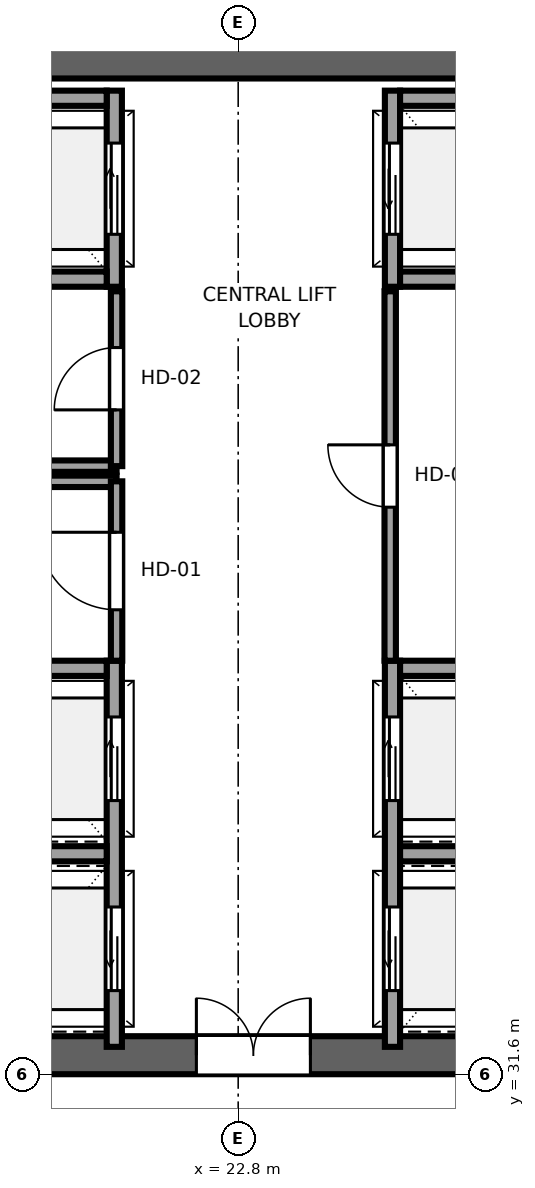
"""IFC4 building model, lengths in metres.
Left out: names, types, materials, properties, quantities, classifications, styles, units other than length and angle.
Written with IfcOpenShell. Run it as: python <this file> out.ifc"""

import sys

from ifc_helpers import new_model, si_unit, direction, frame, frame_2d, origin, place, context, subcontext, project, spatial, rectangle, extrude, source, transform, mapped, element, fill, save


model = new_model("IFC4")
c1 = context("Model", 3, precision=1e-05, world=origin(), true_north=direction((0.0, 1.0)))
c2 = subcontext(c1, "Body", "Model", "MODEL_VIEW")
j1 = project(units=[si_unit("LENGTHUNIT", "METRE"), si_unit("PLANEANGLEUNIT", "RADIAN")], contexts=[c1])
p1 = place(None, origin())
s1 = spatial("IfcSite", under=j1, at=p1, CompositionType="ELEMENT")
p2 = place(p1, origin())
s2 = spatial("IfcBuilding", under=s1, at=p2, CompositionType="ELEMENT")
p3 = place(p2, frame((0.0, 0.0, 286.55)))
s3 = spatial("IfcBuildingStorey", under=s2, at=p3, CompositionType="ELEMENT", Elevation=286.55)
p4 = place(p3, frame((10.0, 31.85, 0.0), z_axis=(0.0, 0.0, 1.0), x_axis=(1.0, 0.0, 0.0)))
e1 = element("IfcWall", 1, at=p4, inside=s3, PredefinedType="SHEAR", context=c2, shape_type="SweptSolid", body=[
    extrude(rectangle(XDim=26.0, YDim=0.5, at=frame_2d((13.0, 0.0))), origin(), (0.0, 0.0, 1.0), 4.4),
])
p5 = place(p4, frame((7.45, 0.0, 0.0), z_axis=(0.0, 0.0, 1.0), x_axis=(-1.0, 0.0, 0.0)))
e2 = element("IfcOpeningElement", 2, at=p5, cuts=e1, PredefinedType="OPENING", context=c2, shape_type="SweptSolid", body=[
    extrude(rectangle(XDim=1.5, YDim=2.04, at=frame_2d((0.75, 1.02))), frame((0.0, 0.26, 0.0), z_axis=(0.0, -1.0, 0.0), x_axis=(1.0, 0.0, 0.0)), (0.0, 0.0, 1.0), 0.52),
])
p6 = place(p4, frame((13.75, 0.0, 0.0), z_axis=(0.0, 0.0, 1.0), x_axis=(-1.0, 0.0, 0.0)))
e3 = element("IfcOpeningElement", 3, at=p6, cuts=e1, PredefinedType="OPENING", context=c2, shape_type="SweptSolid", body=[
    extrude(rectangle(XDim=1.5, YDim=2.04, at=frame_2d((0.75, 1.02))), frame((0.0, 0.26, 0.0), z_axis=(0.0, -1.0, 0.0), x_axis=(1.0, 0.0, 0.0)), (0.0, 0.0, 1.0), 0.52),
])
p7 = place(p4, frame((20.05, 0.0, 0.0), z_axis=(0.0, 0.0, 1.0), x_axis=(-1.0, 0.0, 0.0)))
e4 = element("IfcOpeningElement", 4, at=p7, cuts=e1, PredefinedType="OPENING", context=c2, shape_type="SweptSolid", body=[
    extrude(rectangle(XDim=1.5, YDim=2.04, at=frame_2d((0.75, 1.02))), frame((0.0, 0.26, 0.0), z_axis=(0.0, -1.0, 0.0), x_axis=(1.0, 0.0, 0.0)), (0.0, 0.0, 1.0), 0.52),
])
p8 = place(p3, frame((10.0, 44.95, 0.0), z_axis=(0.0, 0.0, 1.0), x_axis=(1.0, 0.0, 0.0)))
e5 = element("IfcWall", 5, at=p8, inside=s3, PredefinedType="SHEAR", context=c2, shape_type="SweptSolid", body=[
    extrude(rectangle(XDim=26.0, YDim=0.5, at=frame_2d((13.0, 0.0))), origin(), (0.0, 0.0, 1.0), 4.4),
])
p9 = place(p3, frame((21.17, 31.96, 0.0), z_axis=(0.0, 0.0, 1.0), x_axis=(0.0, 1.0, 0.0)))
e6 = element("IfcWall", 6, at=p9, inside=s3, PredefinedType="SOLIDWALL", context=c2, shape_type="SweptSolid", body=[
    extrude(rectangle(XDim=5.08, YDim=0.2, at=frame_2d((2.54, 0.0))), origin(), (0.0, 0.0, 1.0), 4.14),
])
p10 = place(p9, frame((0.74, 0.0, 0.0)))
e7 = element("IfcOpeningElement", 7, at=p10, cuts=e6, PredefinedType="OPENING", context=c2, shape_type="SweptSolid", body=[
    extrude(rectangle(XDim=1.1, YDim=2.12, at=frame_2d((0.55, 1.06))), frame((0.0, 0.11, 0.0), z_axis=(0.0, -1.0, 0.0), x_axis=(1.0, 0.0, 0.0)), (0.0, 0.0, 1.0), 0.22),
])
p11 = place(p9, frame((3.24, 0.0, 0.0)))
e8 = element("IfcOpeningElement", 8, at=p11, cuts=e6, PredefinedType="OPENING", context=c2, shape_type="SweptSolid", body=[
    extrude(rectangle(XDim=1.1, YDim=2.12, at=frame_2d((0.55, 1.06))), frame((0.0, 0.11, 0.0), z_axis=(0.0, -1.0, 0.0), x_axis=(1.0, 0.0, 0.0)), (0.0, 0.0, 1.0), 0.22),
])
p12 = place(p3, frame((19.23, 36.94, 0.0), z_axis=(0.0, 0.0, 1.0), x_axis=(1.0, 0.0, 0.0)))
e9 = element("IfcWall", 9, at=p12, inside=s3, PredefinedType="SOLIDWALL", context=c2, shape_type="SweptSolid", body=[
    extrude(rectangle(XDim=1.84, YDim=0.2, at=frame_2d((0.92, 0.0))), origin(), (0.0, 0.0, 1.0), 4.14),
])
p13 = place(p3, frame((19.27, 34.5, 0.0), z_axis=(0.0, 0.0, 1.0), x_axis=(1.0, 0.0, 0.0)))
e10 = element("IfcWall", 10, at=p13, inside=s3, PredefinedType="SOLIDWALL", context=c2, shape_type="SweptSolid", body=[
    extrude(rectangle(XDim=1.8, YDim=0.2, at=frame_2d((0.9, 0.0))), origin(), (0.0, 0.0, 1.0), 4.14),
])
p14 = place(p3, frame((21.17, 41.96, 0.0), z_axis=(0.0, 0.0, 1.0), x_axis=(0.0, 1.0, 0.0)))
e11 = element("IfcWall", 11, at=p14, inside=s3, PredefinedType="SOLIDWALL", context=c2, shape_type="SweptSolid", body=[
    extrude(rectangle(XDim=2.58, YDim=0.2, at=frame_2d((1.29, 0.0))), origin(), (0.0, 0.0, 1.0), 4.14),
])
p15 = place(p14, frame((0.69, 0.0, 0.0)))
e12 = element("IfcOpeningElement", 12, at=p15, cuts=e11, PredefinedType="OPENING", context=c2, shape_type="SweptSolid", body=[
    extrude(rectangle(XDim=1.2, YDim=2.15, at=frame_2d((0.6, 1.075))), frame((0.0, 0.11, 0.0), z_axis=(0.0, -1.0, 0.0), x_axis=(1.0, 0.0, 0.0)), (0.0, 0.0, 1.0), 0.22),
])
for number, where, z_axis, x_axis in (
    (13, (19.23, 42.06, 0.0), (0.0, 0.0, 1.0), (1.0, 0.0, 0.0)),
    (14, (19.23, 44.44, 0.0), (0.0, 0.0, 1.0), (1.0, 0.0, 0.0)),
):
    element("IfcWall", number, at=place(p3, frame(where, z_axis=z_axis, x_axis=x_axis)), inside=s3, PredefinedType="SOLIDWALL", context=c2, shape_type="SweptSolid", body=[
        extrude(rectangle(XDim=1.84, YDim=0.2, at=frame_2d((0.92, 0.0))), origin(), (0.0, 0.0, 1.0), 4.14),
    ])
p16 = place(p3, frame((24.83, 31.96, 0.0), z_axis=(0.0, 0.0, 1.0), x_axis=(0.0, 1.0, 0.0)))
e15 = element("IfcWall", 15, at=p16, inside=s3, PredefinedType="SOLIDWALL", context=c2, shape_type="SweptSolid", body=[
    extrude(rectangle(XDim=5.08, YDim=0.2, at=frame_2d((2.54, 0.0))), origin(), (0.0, 0.0, 1.0), 4.14),
])
p17 = place(p16, frame((0.74, 0.0, 0.0)))
e16 = element("IfcOpeningElement", 16, at=p17, cuts=e15, PredefinedType="OPENING", context=c2, shape_type="SweptSolid", body=[
    extrude(rectangle(XDim=1.1, YDim=2.12, at=frame_2d((0.55, 1.06))), frame((0.0, 0.11, 0.0), z_axis=(0.0, -1.0, 0.0), x_axis=(1.0, 0.0, 0.0)), (0.0, 0.0, 1.0), 0.22),
])
p18 = place(p16, frame((3.24, 0.0, 0.0)))
e17 = element("IfcOpeningElement", 17, at=p18, cuts=e15, PredefinedType="OPENING", context=c2, shape_type="SweptSolid", body=[
    extrude(rectangle(XDim=1.1, YDim=2.12, at=frame_2d((0.55, 1.06))), frame((0.0, 0.11, 0.0), z_axis=(0.0, -1.0, 0.0), x_axis=(1.0, 0.0, 0.0)), (0.0, 0.0, 1.0), 0.22),
])
p19 = place(p3, frame((24.93, 36.94, 0.0), z_axis=(0.0, 0.0, 1.0), x_axis=(1.0, 0.0, 0.0)))
e18 = element("IfcWall", 18, at=p19, inside=s3, PredefinedType="SOLIDWALL", context=c2, shape_type="SweptSolid", body=[
    extrude(rectangle(XDim=1.84, YDim=0.2, at=frame_2d((0.92, 0.0))), origin(), (0.0, 0.0, 1.0), 4.14),
])
p20 = place(p3, frame((24.93, 34.5, 0.0), z_axis=(0.0, 0.0, 1.0), x_axis=(1.0, 0.0, 0.0)))
e19 = element("IfcWall", 19, at=p20, inside=s3, PredefinedType="SOLIDWALL", context=c2, shape_type="SweptSolid", body=[
    extrude(rectangle(XDim=1.8, YDim=0.2, at=frame_2d((0.9, 0.0))), origin(), (0.0, 0.0, 1.0), 4.14),
])
p21 = place(p3, frame((24.83, 41.96, 0.0), z_axis=(0.0, 0.0, 1.0), x_axis=(0.0, 1.0, 0.0)))
e20 = element("IfcWall", 20, at=p21, inside=s3, PredefinedType="SOLIDWALL", context=c2, shape_type="SweptSolid", body=[
    extrude(rectangle(XDim=2.58, YDim=0.2, at=frame_2d((1.29, 0.0))), origin(), (0.0, 0.0, 1.0), 4.14),
])
p22 = place(p21, frame((0.69, 0.0, 0.0)))
e21 = element("IfcOpeningElement", 21, at=p22, cuts=e20, PredefinedType="OPENING", context=c2, shape_type="SweptSolid", body=[
    extrude(rectangle(XDim=1.2, YDim=2.15, at=frame_2d((0.6, 1.075))), frame((0.0, 0.11, 0.0), z_axis=(0.0, -1.0, 0.0), x_axis=(1.0, 0.0, 0.0)), (0.0, 0.0, 1.0), 0.22),
])
for number, where, z_axis, x_axis in (
    (22, (24.93, 42.06, 0.0), (0.0, 0.0, 1.0), (1.0, 0.0, 0.0)),
    (23, (24.93, 44.44, 0.0), (0.0, 0.0, 1.0), (1.0, 0.0, 0.0)),
):
    element("IfcWall", number, at=place(p3, frame(where, z_axis=z_axis, x_axis=x_axis)), inside=s3, PredefinedType="SOLIDWALL", context=c2, shape_type="SweptSolid", body=[
        extrude(rectangle(XDim=1.84, YDim=0.2, at=frame_2d((0.92, 0.0))), origin(), (0.0, 0.0, 1.0), 4.14),
    ])
p23 = place(p3, frame((19.2, 39.4, 0.0), z_axis=(0.0, 0.0, 1.0), x_axis=(1.0, 0.0, 0.0)))
e24 = element("IfcWall", 24, at=p23, inside=s3, PredefinedType="PARTITIONING", context=c2, shape_type="SweptSolid", body=[
    extrude(rectangle(XDim=2.0, YDim=0.15, at=frame_2d((1.0, 0.0))), origin(), (0.0, 0.0, 1.0), 4.14),
])
p24 = place(p3, frame((21.2, 37.04, 0.0), z_axis=(0.0, 0.0, 1.0), x_axis=(0.0, 1.0, 0.0)))
e25 = element("IfcWall", 25, at=p24, inside=s3, PredefinedType="PARTITIONING", context=c2, shape_type="SweptSolid", body=[
    extrude(rectangle(XDim=2.36, YDim=0.15, at=frame_2d((1.18, 0.0))), origin(), (0.0, 0.0, 1.0), 4.14),
])
p25 = place(p24, frame((0.67, 0.0, 0.0)))
e26 = element("IfcOpeningElement", 26, at=p25, cuts=e25, PredefinedType="OPENING", context=c2, shape_type="SweptSolid", body=[
    extrude(rectangle(XDim=1.02, YDim=2.03, at=frame_2d((0.51, 1.015))), frame((0.0, 0.085, 0.0), z_axis=(0.0, -1.0, 0.0), x_axis=(1.0, 0.0, 0.0)), (0.0, 0.0, 1.0), 0.17),
])
p26 = place(p3, frame((19.2, 39.6, 0.0), z_axis=(0.0, 0.0, 1.0), x_axis=(1.0, 0.0, 0.0)))
e27 = element("IfcWall", 27, at=p26, inside=s3, PredefinedType="PARTITIONING", context=c2, shape_type="SweptSolid", body=[
    extrude(rectangle(XDim=2.0, YDim=0.15, at=frame_2d((1.0, 0.0))), origin(), (0.0, 0.0, 1.0), 4.14),
])
p27 = place(p3, frame((21.2, 39.6, 0.0), z_axis=(0.0, 0.0, 1.0), x_axis=(0.0, 1.0, 0.0)))
e28 = element("IfcWall", 28, at=p27, inside=s3, PredefinedType="PARTITIONING", context=c2, shape_type="SweptSolid", body=[
    extrude(rectangle(XDim=2.3, YDim=0.15, at=frame_2d((1.15, 0.0))), origin(), (0.0, 0.0, 1.0), 4.14),
])
p28 = place(p27, frame((0.74, 0.0, 0.0)))
e29 = element("IfcOpeningElement", 29, at=p28, cuts=e28, PredefinedType="OPENING", context=c2, shape_type="SweptSolid", body=[
    extrude(rectangle(XDim=0.82, YDim=2.01, at=frame_2d((0.41, 1.005))), frame((0.0, 0.085, 0.0), z_axis=(0.0, -1.0, 0.0), x_axis=(1.0, 0.0, 0.0)), (0.0, 0.0, 1.0), 0.17),
])
p29 = place(p3, frame((24.8, 37.04, 0.0), z_axis=(0.0, 0.0, 1.0), x_axis=(0.0, 1.0, 0.0)))
e30 = element("IfcWall", 30, at=p29, inside=s3, PredefinedType="PARTITIONING", context=c2, shape_type="SweptSolid", body=[
    extrude(rectangle(XDim=4.86, YDim=0.15, at=frame_2d((2.43, 0.0))), origin(), (0.0, 0.0, 1.0), 4.14),
])
p30 = place(p29, frame((2.02, 0.0, 0.0)))
e31 = element("IfcOpeningElement", 31, at=p30, cuts=e30, PredefinedType="OPENING", context=c2, shape_type="SweptSolid", body=[
    extrude(rectangle(XDim=0.82, YDim=2.01, at=frame_2d((0.41, 1.005))), frame((0.0, 0.085, 0.0), z_axis=(0.0, -1.0, 0.0), x_axis=(1.0, 0.0, 0.0)), (0.0, 0.0, 1.0), 0.17),
])
m1 = source(origin(), c2, "Body", "SweptSolid", [
    extrude(rectangle(XDim=1.5, YDim=2.04, at=frame_2d((0.75, 1.02))), frame((0.0, 0.025, 0.0), z_axis=(0.0, -1.0, 0.0), x_axis=(1.0, 0.0, 0.0)), (0.0, 0.0, 1.0), 0.05),
])
p31 = place(p6, origin())
e32 = element("IfcDoor", 32, at=p31, inside=s3, OperationType="DOUBLE_DOOR_SINGLE_SWING", PredefinedType="DOOR", context=c2, shape_type="MappedRepresentation", body=[
    mapped(m1, transform((0.0, 0.0, 0.0), x_axis=(1.0, 0.0, 0.0), y_axis=(0.0, 1.0, 0.0), z_axis=(0.0, 0.0, 1.0), scale=1.0)),
])
fill(e3, e32)
m2 = source(origin(), c2, "Body", "SweptSolid", [
    extrude(rectangle(XDim=1.1, YDim=2.12, at=frame_2d((0.55, 1.06))), frame((0.0, 0.025, 0.0), z_axis=(0.0, -1.0, 0.0), x_axis=(1.0, 0.0, 0.0)), (0.0, 0.0, 1.0), 0.05),
])
p32 = place(p10, origin())
e33 = element("IfcDoor", 33, at=p32, inside=s3, OperationType="SLIDING_TO_LEFT", PredefinedType="DOOR", context=c2, shape_type="MappedRepresentation", body=[
    mapped(m2, transform((0.0, 0.0, 0.0), x_axis=(1.0, 0.0, 0.0), y_axis=(0.0, 1.0, 0.0), z_axis=(0.0, 0.0, 1.0), scale=1.0)),
])
fill(e7, e33)
p33 = place(p11, origin())
e34 = element("IfcDoor", 34, at=p33, inside=s3, OperationType="SLIDING_TO_RIGHT", PredefinedType="DOOR", context=c2, shape_type="MappedRepresentation", body=[
    mapped(m2, transform((0.0, 0.0, 0.0), x_axis=(1.0, 0.0, 0.0), y_axis=(0.0, 1.0, 0.0), z_axis=(0.0, 0.0, 1.0), scale=1.0)),
])
fill(e8, e34)
m3 = source(origin(), c2, "Body", "SweptSolid", [
    extrude(rectangle(XDim=1.2, YDim=2.15, at=frame_2d((0.6, 1.075))), frame((0.0, 0.025, 0.0), z_axis=(0.0, -1.0, 0.0), x_axis=(1.0, 0.0, 0.0)), (0.0, 0.0, 1.0), 0.05),
])
p34 = place(p15, origin())
e35 = element("IfcDoor", 35, at=p34, inside=s3, OperationType="SLIDING_TO_RIGHT", PredefinedType="DOOR", context=c2, shape_type="MappedRepresentation", body=[
    mapped(m3, transform((0.0, 0.0, 0.0), x_axis=(1.0, 0.0, 0.0), y_axis=(0.0, 1.0, 0.0), z_axis=(0.0, 0.0, 1.0), scale=1.0)),
])
fill(e12, e35)
p35 = place(p17, origin())
e36 = element("IfcDoor", 36, at=p35, inside=s3, OperationType="SLIDING_TO_LEFT", PredefinedType="DOOR", context=c2, shape_type="MappedRepresentation", body=[
    mapped(m2, transform((0.0, 0.0, 0.0), x_axis=(1.0, 0.0, 0.0), y_axis=(0.0, 1.0, 0.0), z_axis=(0.0, 0.0, 1.0), scale=1.0)),
])
fill(e16, e36)
p36 = place(p18, origin())
e37 = element("IfcDoor", 37, at=p36, inside=s3, OperationType="SLIDING_TO_RIGHT", PredefinedType="DOOR", context=c2, shape_type="MappedRepresentation", body=[
    mapped(m2, transform((0.0, 0.0, 0.0), x_axis=(1.0, 0.0, 0.0), y_axis=(0.0, 1.0, 0.0), z_axis=(0.0, 0.0, 1.0), scale=1.0)),
])
fill(e17, e37)
p37 = place(p22, origin())
e38 = element("IfcDoor", 38, at=p37, inside=s3, OperationType="SLIDING_TO_LEFT", PredefinedType="DOOR", context=c2, shape_type="MappedRepresentation", body=[
    mapped(m3, transform((0.0, 0.0, 0.0), x_axis=(1.0, 0.0, 0.0), y_axis=(0.0, 1.0, 0.0), z_axis=(0.0, 0.0, 1.0), scale=1.0)),
])
fill(e21, e38)
m4 = source(origin(), c2, "Body", "SweptSolid", [
    extrude(rectangle(XDim=1.02, YDim=2.03, at=frame_2d((0.51, 1.015))), frame((0.0, 0.025, 0.0), z_axis=(0.0, -1.0, 0.0), x_axis=(1.0, 0.0, 0.0)), (0.0, 0.0, 1.0), 0.05),
])
p38 = place(p25, origin())
e39 = element("IfcDoor", 39, at=p38, inside=s3, OperationType="SINGLE_SWING_RIGHT", PredefinedType="DOOR", context=c2, shape_type="MappedRepresentation", body=[
    mapped(m4, transform((0.0, 0.0, 0.0), x_axis=(1.0, 0.0, 0.0), y_axis=(0.0, 1.0, 0.0), z_axis=(0.0, 0.0, 1.0), scale=1.0)),
])
fill(e26, e39)
m5 = source(origin(), c2, "Body", "SweptSolid", [
    extrude(rectangle(XDim=0.82, YDim=2.01, at=frame_2d((0.41, 1.005))), frame((0.0, 0.025, 0.0), z_axis=(0.0, -1.0, 0.0), x_axis=(1.0, 0.0, 0.0)), (0.0, 0.0, 1.0), 0.05),
])
p39 = place(p28, origin())
e40 = element("IfcDoor", 40, at=p39, inside=s3, OperationType="SINGLE_SWING_LEFT", PredefinedType="DOOR", context=c2, shape_type="MappedRepresentation", body=[
    mapped(m5, transform((0.0, 0.0, 0.0), x_axis=(1.0, 0.0, 0.0), y_axis=(0.0, 1.0, 0.0), z_axis=(0.0, 0.0, 1.0), scale=1.0)),
])
fill(e29, e40)
p40 = place(p30, origin())
e41 = element("IfcDoor", 41, at=p40, inside=s3, OperationType="SINGLE_SWING_RIGHT", PredefinedType="DOOR", context=c2, shape_type="MappedRepresentation", body=[
    mapped(m5, transform((0.0, 0.0, 0.0), x_axis=(1.0, 0.0, 0.0), y_axis=(0.0, 1.0, 0.0), z_axis=(0.0, 0.0, 1.0), scale=1.0)),
])
fill(e31, e41)
save(model, sys.argv[1])
